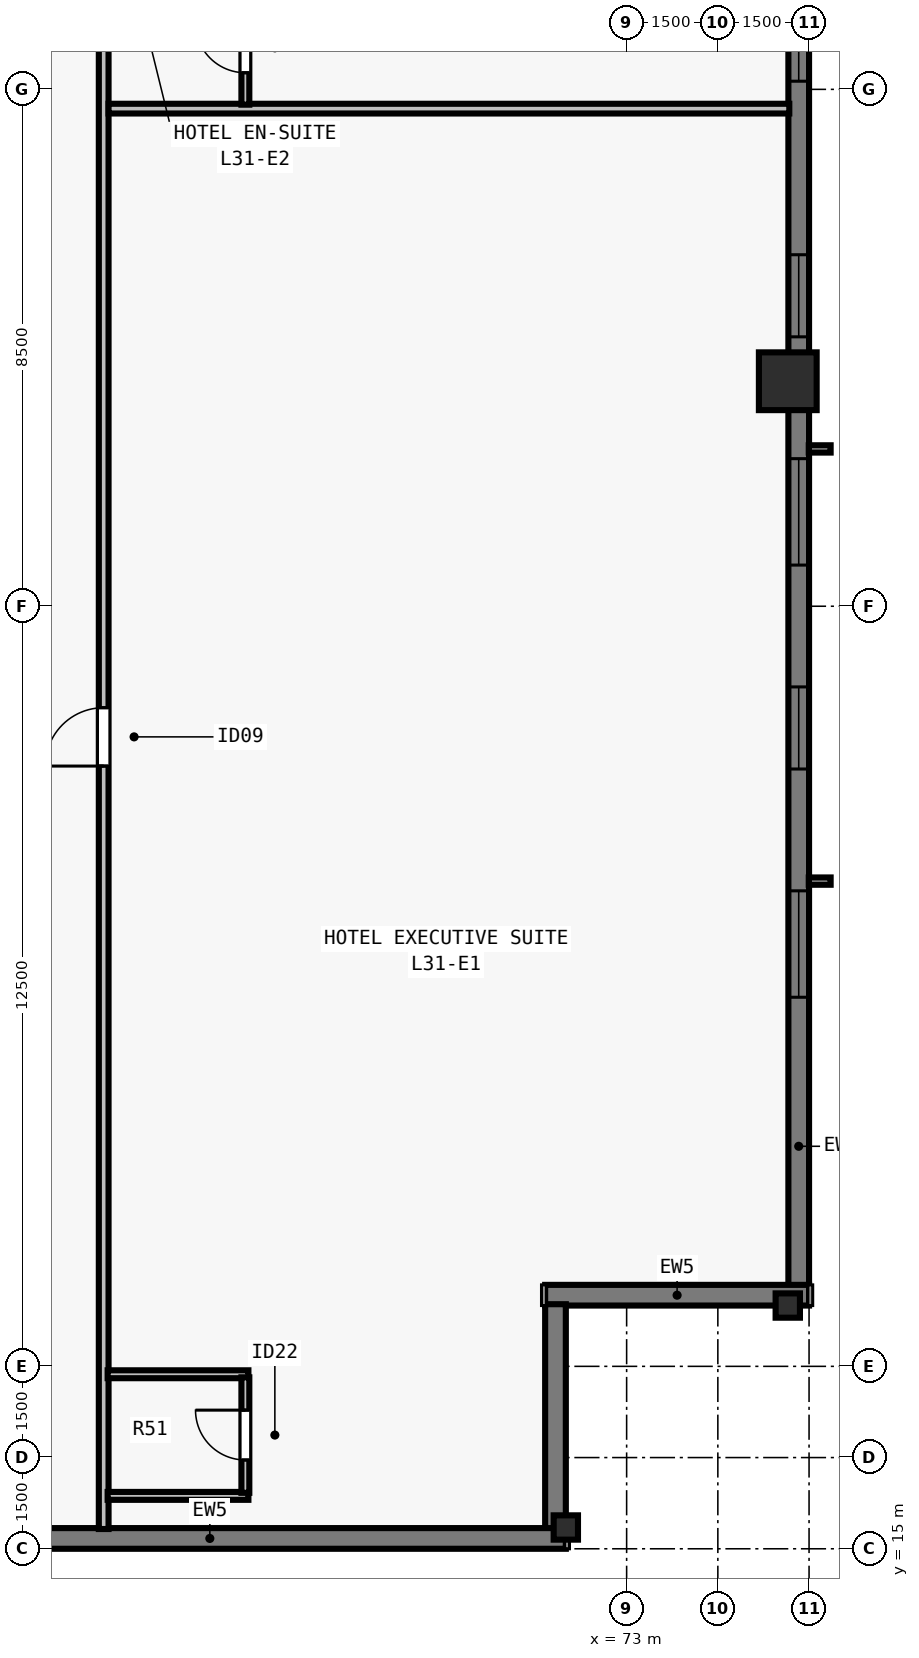
"""IFC4 building model, lengths in metres.
Left out: names, types, materials, properties, quantities, classifications, styles, units other than length and angle.
Written with IfcOpenShell. Run it as: python <this file> out.ifc"""

import sys

from ifc_helpers import new_model, si_unit, direction, frame, frame_2d, origin, origin_2d, place, context, subcontext, project, spatial, rectangle, i_section, extrude, element, fill, save


model = new_model("IFC4")
c1 = context("Model", 3, precision=1e-05, world=origin(), true_north=direction((0.0, 1.0)))
c2 = subcontext(c1, "Body", "Model", "MODEL_VIEW")
j1 = project(units=[si_unit("LENGTHUNIT", "METRE"), si_unit("PLANEANGLEUNIT", "RADIAN")], contexts=[c1])
p1 = place(None, origin())
s1 = spatial("IfcSite", under=j1, at=p1, CompositionType="ELEMENT")
p2 = place(p1, origin())
s2 = spatial("IfcBuilding", under=s1, at=p2, CompositionType="ELEMENT")
p3 = place(p2, frame((0.0, 0.0, 116.5)))
s3 = spatial("IfcBuildingStorey", under=s2, at=p3, CompositionType="ELEMENT", Elevation=116.5)
for number, where, z_axis, x_axis in (
    (1, (72.0, 15.35, 0.0), (0.0, 0.0, 1.0), (1.0, 0.0, 0.0)),
    (2, (75.65, 19.0, 0.0), (0.0, 0.0, 1.0), (0.0, 1.0, 0.0)),
):
    element("IfcColumn", number, at=place(p3, frame(where, z_axis=z_axis, x_axis=x_axis)), inside=s3, PredefinedType="COLUMN", context=c2, shape_type="SweptSolid", body=[
        extrude(i_section(OverallWidth=0.4, OverallDepth=0.4, WebThickness=0.022, FlangeThickness=0.036, at=origin_2d()), origin(), (0.0, 0.0, 1.0), 3.5),
    ])
p4 = place(p3, frame((75.65, 34.2, 0.0), z_axis=(0.0, 0.0, 1.0), x_axis=(0.0, 1.0, 0.0)))
e3 = element("IfcColumn", 3, at=p4, inside=s3, PredefinedType="COLUMN", context=c2, shape_type="SweptSolid", body=[
    extrude(rectangle(XDim=0.95, YDim=0.95, at=origin_2d()), origin(), (0.0, 0.0, 1.0), 3.5),
])
p5 = place(p3, frame((75.83, 59.0, 0.0), z_axis=(0.0, 0.0, 1.0), x_axis=(0.0, -1.0, 0.0)))
e4 = element("IfcWall", 4, at=p5, inside=s3, PredefinedType="SOLIDWALL", context=c2, shape_type="SweptSolid", body=[
    extrude(rectangle(XDim=39.682, YDim=0.34, at=frame_2d((19.841, 0.0))), origin(), (0.0, 0.0, 1.0), 3.28),
])
p6 = place(p5, frame((4.752, 0.0, 0.8)))
e5 = element("IfcOpeningElement", 5, at=p6, cuts=e4, PredefinedType="OPENING", context=c2, shape_type="SweptSolid", body=[
    extrude(rectangle(XDim=1.75, YDim=1.66, at=frame_2d((0.875, 0.83))), frame((0.0, 0.18, 0.0), z_axis=(0.0, -1.0, 0.0), x_axis=(1.0, 0.0, 0.0)), (0.0, 0.0, 1.0), 0.36),
])
p7 = place(p5, frame((8.505, 0.0, 0.8)))
e6 = element("IfcOpeningElement", 6, at=p7, cuts=e4, PredefinedType="OPENING", context=c2, shape_type="SweptSolid", body=[
    extrude(rectangle(XDim=1.35, YDim=1.66, at=frame_2d((0.675, 0.83))), frame((0.0, 0.18, 0.0), z_axis=(0.0, -1.0, 0.0), x_axis=(1.0, 0.0, 0.0)), (0.0, 0.0, 1.0), 0.36),
])
p8 = place(p5, frame((11.859, 0.0, 0.8)))
e7 = element("IfcOpeningElement", 7, at=p8, cuts=e4, PredefinedType="OPENING", context=c2, shape_type="SweptSolid", body=[
    extrude(rectangle(XDim=1.75, YDim=1.66, at=frame_2d((0.875, 0.83))), frame((0.0, 0.18, 0.0), z_axis=(0.0, -1.0, 0.0), x_axis=(1.0, 0.0, 0.0)), (0.0, 0.0, 1.0), 0.36),
])
p9 = place(p5, frame((16.062, 0.0, 0.8)))
e8 = element("IfcOpeningElement", 8, at=p9, cuts=e4, PredefinedType="OPENING", context=c2, shape_type="SweptSolid", body=[
    extrude(rectangle(XDim=1.35, YDim=1.66, at=frame_2d((0.675, 0.83))), frame((0.0, 0.18, 0.0), z_axis=(0.0, -1.0, 0.0), x_axis=(1.0, 0.0, 0.0)), (0.0, 0.0, 1.0), 0.36),
])
p10 = place(p5, frame((18.116, 0.0, 0.8)))
e9 = element("IfcOpeningElement", 9, at=p10, cuts=e4, PredefinedType="OPENING", context=c2, shape_type="SweptSolid", body=[
    extrude(rectangle(XDim=1.75, YDim=1.66, at=frame_2d((0.875, 0.83))), frame((0.0, 0.18, 0.0), z_axis=(0.0, -1.0, 0.0), x_axis=(1.0, 0.0, 0.0)), (0.0, 0.0, 1.0), 0.36),
])
p11 = place(p5, frame((22.719, 0.0, 0.8)))
e10 = element("IfcOpeningElement", 10, at=p11, cuts=e4, PredefinedType="OPENING", context=c2, shape_type="SweptSolid", body=[
    extrude(rectangle(XDim=1.35, YDim=1.66, at=frame_2d((0.675, 0.83))), frame((0.0, 0.18, 0.0), z_axis=(0.0, -1.0, 0.0), x_axis=(1.0, 0.0, 0.0)), (0.0, 0.0, 1.0), 0.36),
])
p12 = place(p5, frame((26.073, 0.0, 0.8)))
e11 = element("IfcOpeningElement", 11, at=p12, cuts=e4, PredefinedType="OPENING", context=c2, shape_type="SweptSolid", body=[
    extrude(rectangle(XDim=1.75, YDim=1.66, at=frame_2d((0.875, 0.83))), frame((0.0, 0.18, 0.0), z_axis=(0.0, -1.0, 0.0), x_axis=(1.0, 0.0, 0.0)), (0.0, 0.0, 1.0), 0.36),
])
p13 = place(p5, frame((29.827, 0.0, 0.8)))
e12 = element("IfcOpeningElement", 12, at=p13, cuts=e4, PredefinedType="OPENING", context=c2, shape_type="SweptSolid", body=[
    extrude(rectangle(XDim=1.35, YDim=1.66, at=frame_2d((0.675, 0.83))), frame((0.0, 0.18, 0.0), z_axis=(0.0, -1.0, 0.0), x_axis=(1.0, 0.0, 0.0)), (0.0, 0.0, 1.0), 0.36),
])
p14 = place(p5, frame((33.18, 0.0, 0.8)))
e13 = element("IfcOpeningElement", 13, at=p14, cuts=e4, PredefinedType="OPENING", context=c2, shape_type="SweptSolid", body=[
    extrude(rectangle(XDim=1.75, YDim=1.66, at=frame_2d((0.875, 0.83))), frame((0.0, 0.18, 0.0), z_axis=(0.0, -1.0, 0.0), x_axis=(1.0, 0.0, 0.0)), (0.0, 0.0, 1.0), 0.36),
])
p15 = place(p3, frame((76.0, 19.17, 0.0), z_axis=(0.0, 0.0, 1.0), x_axis=(-1.0, 0.0, 0.0)))
e14 = element("IfcWall", 14, at=p15, inside=s3, PredefinedType="SOLIDWALL", context=c2, shape_type="SweptSolid", body=[
    extrude(rectangle(XDim=4.34, YDim=0.34, at=frame_2d((2.17, 0.0))), origin(), (0.0, 0.0, 1.0), 3.28),
])
p16 = place(p3, frame((71.83, 19.022, 0.0), z_axis=(0.0, 0.0, 1.0), x_axis=(0.0, -1.0, 0.0)))
e15 = element("IfcWall", 15, at=p16, inside=s3, PredefinedType="SOLIDWALL", context=c2, shape_type="SweptSolid", body=[
    extrude(rectangle(XDim=3.704, YDim=0.34, at=frame_2d((1.852, 0.0))), origin(), (0.0, 0.0, 1.0), 3.28),
])
p17 = place(p3, frame((72.0, 15.17, 0.0), z_axis=(0.0, 0.0, 1.0), x_axis=(-1.0, 0.0, 0.0)))
e16 = element("IfcWall", 16, at=p17, inside=s3, PredefinedType="SOLIDWALL", context=c2, shape_type="SweptSolid", body=[
    extrude(rectangle(XDim=39.682, YDim=0.34, at=frame_2d((19.841, 0.0))), origin(), (0.0, 0.0, 1.0), 3.28),
])
p18 = place(p17, frame((11.859, 0.0, 0.8)))
e17 = element("IfcOpeningElement", 17, at=p18, cuts=e16, PredefinedType="OPENING", context=c2, shape_type="SweptSolid", body=[
    extrude(rectangle(XDim=1.75, YDim=1.66, at=frame_2d((0.875, 0.83))), frame((0.0, 0.18, 0.0), z_axis=(0.0, -1.0, 0.0), x_axis=(1.0, 0.0, 0.0)), (0.0, 0.0, 1.0), 0.36),
])
p19 = place(p17, frame((16.062, 0.0, 0.8)))
e18 = element("IfcOpeningElement", 18, at=p19, cuts=e16, PredefinedType="OPENING", context=c2, shape_type="SweptSolid", body=[
    extrude(rectangle(XDim=1.35, YDim=1.66, at=frame_2d((0.675, 0.83))), frame((0.0, 0.18, 0.0), z_axis=(0.0, -1.0, 0.0), x_axis=(1.0, 0.0, 0.0)), (0.0, 0.0, 1.0), 0.36),
])
p20 = place(p17, frame((18.966, 0.0, 0.8)))
e19 = element("IfcOpeningElement", 19, at=p20, cuts=e16, PredefinedType="OPENING", context=c2, shape_type="SweptSolid", body=[
    extrude(rectangle(XDim=1.75, YDim=1.66, at=frame_2d((0.875, 0.83))), frame((0.0, 0.18, 0.0), z_axis=(0.0, -1.0, 0.0), x_axis=(1.0, 0.0, 0.0)), (0.0, 0.0, 1.0), 0.36),
])
p21 = place(p17, frame((21.469, 0.0, 0.8)))
e20 = element("IfcOpeningElement", 20, at=p21, cuts=e16, PredefinedType="OPENING", context=c2, shape_type="SweptSolid", body=[
    extrude(rectangle(XDim=1.35, YDim=1.66, at=frame_2d((0.675, 0.83))), frame((0.0, 0.18, 0.0), z_axis=(0.0, -1.0, 0.0), x_axis=(1.0, 0.0, 0.0)), (0.0, 0.0, 1.0), 0.36),
])
p22 = place(p17, frame((27.323, 0.0, 0.8)))
e21 = element("IfcOpeningElement", 21, at=p22, cuts=e16, PredefinedType="OPENING", context=c2, shape_type="SweptSolid", body=[
    extrude(rectangle(XDim=1.75, YDim=1.66, at=frame_2d((0.875, 0.83))), frame((0.0, 0.18, 0.0), z_axis=(0.0, -1.0, 0.0), x_axis=(1.0, 0.0, 0.0)), (0.0, 0.0, 1.0), 0.36),
])
p23 = place(p17, frame((29.827, 0.0, 0.8)))
e22 = element("IfcOpeningElement", 22, at=p23, cuts=e16, PredefinedType="OPENING", context=c2, shape_type="SweptSolid", body=[
    extrude(rectangle(XDim=1.35, YDim=1.66, at=frame_2d((0.675, 0.83))), frame((0.0, 0.18, 0.0), z_axis=(0.0, -1.0, 0.0), x_axis=(1.0, 0.0, 0.0)), (0.0, 0.0, 1.0), 0.36),
])
p24 = place(p17, frame((25.43, 0.0, 0.8)))
e23 = element("IfcOpeningElement", 23, at=p24, cuts=e16, PredefinedType="OPENING", context=c2, shape_type="SweptSolid", body=[
    extrude(rectangle(XDim=0.9, YDim=1.66, at=frame_2d((0.45, 0.83))), frame((0.0, 0.18, 0.0), z_axis=(0.0, -1.0, 0.0), x_axis=(1.0, 0.0, 0.0)), (0.0, 0.0, 1.0), 0.36),
])
p25 = place(p17, frame((34.39, 0.0, 0.8)))
e24 = element("IfcOpeningElement", 24, at=p25, cuts=e16, PredefinedType="OPENING", context=c2, shape_type="SweptSolid", body=[
    extrude(rectangle(XDim=0.9, YDim=1.66, at=frame_2d((0.45, 0.83))), frame((0.0, 0.18, 0.0), z_axis=(0.0, -1.0, 0.0), x_axis=(1.0, 0.0, 0.0)), (0.0, 0.0, 1.0), 0.36),
])
p26 = place(p3, frame((64.4, 15.325, 0.0), z_axis=(0.0, 0.0, 1.0), x_axis=(0.0, 1.0, 0.0)))
e25 = element("IfcWall", 25, at=p26, inside=s3, PredefinedType="PARTITIONING", context=c2, shape_type="SweptSolid", body=[
    extrude(rectangle(XDim=47.35, YDim=0.16, at=frame_2d((23.675, 0.0))), origin(), (0.0, 0.0, 1.0), 2.555),
])
p27 = place(p26, frame((12.547, 0.0, 0.0)))
e26 = element("IfcOpeningElement", 26, at=p27, cuts=e25, PredefinedType="OPENING", context=c2, shape_type="SweptSolid", body=[
    extrude(rectangle(XDim=0.96, YDim=2.15, at=frame_2d((0.48, 1.075))), frame((0.0, 0.09, 0.0), z_axis=(0.0, -1.0, 0.0), x_axis=(1.0, 0.0, 0.0)), (0.0, 0.0, 1.0), 0.18),
])
p28 = place(p26, frame((35.902, 0.0, 0.0)))
e27 = element("IfcOpeningElement", 27, at=p28, cuts=e25, PredefinedType="OPENING", context=c2, shape_type="SweptSolid", body=[
    extrude(rectangle(XDim=0.96, YDim=2.15, at=frame_2d((0.48, 1.075))), frame((0.0, 0.09, 0.0), z_axis=(0.0, -1.0, 0.0), x_axis=(1.0, 0.0, 0.0)), (0.0, 0.0, 1.0), 0.18),
])
for number, where, z_axis, x_axis in (
    (28, (64.465, 15.87, 0.0), (0.0, 0.0, 1.0), (1.0, 0.0, 0.0)),
    (29, (64.465, 17.87, 0.0), (0.0, 0.0, 1.0), (1.0, 0.0, 0.0)),
):
    element("IfcWall", number, at=place(p3, frame(where, z_axis=z_axis, x_axis=x_axis)), inside=s3, PredefinedType="PLUMBINGWALL", context=c2, shape_type="SweptSolid", body=[
        extrude(rectangle(XDim=2.315, YDim=0.13, at=frame_2d((1.157, 0.0))), origin(), (0.0, 0.0, 1.0), 3.28),
    ])
p29 = place(p3, frame((66.73, 15.92, 0.0), z_axis=(0.0, 0.0, 1.0), x_axis=(0.0, 1.0, 0.0)))
e30 = element("IfcWall", 30, at=p29, inside=s3, PredefinedType="PLUMBINGWALL", context=c2, shape_type="SweptSolid", body=[
    extrude(rectangle(XDim=1.9, YDim=0.13, at=frame_2d((0.95, 0.0))), origin(), (0.0, 0.0, 1.0), 3.28),
])
p30 = place(p29, frame((0.54, 0.0, 0.0)))
e31 = element("IfcOpeningElement", 31, at=p30, cuts=e30, PredefinedType="OPENING", context=c2, shape_type="SweptSolid", body=[
    extrude(rectangle(XDim=0.82, YDim=2.1, at=frame_2d((0.41, 1.05))), frame((0.0, 0.075, 0.0), z_axis=(0.0, -1.0, 0.0), x_axis=(1.0, 0.0, 0.0)), (0.0, 0.0, 1.0), 0.15),
])
p31 = place(p3, frame((64.48, 38.683, 0.0), z_axis=(0.0, 0.0, 1.0), x_axis=(1.0, 0.0, 0.0)))
e32 = element("IfcWall", 32, at=p31, inside=s3, PredefinedType="PARTITIONING", context=c2, shape_type="SweptSolid", body=[
    extrude(rectangle(XDim=11.195, YDim=0.16, at=frame_2d((5.598, 0.0))), origin(), (0.0, 0.0, 1.0), 3.28),
])
p32 = place(p3, frame((66.73, 38.748, 0.0), z_axis=(0.0, 0.0, 1.0), x_axis=(0.0, 1.0, 0.0)))
e33 = element("IfcWall", 33, at=p32, inside=s3, PredefinedType="PLUMBINGWALL", context=c2, shape_type="SweptSolid", body=[
    extrude(rectangle(XDim=1.885, YDim=0.13, at=frame_2d((0.942, 0.0))), origin(), (0.0, 0.0, 1.0), 3.28),
])
p33 = place(p32, frame((0.525, 0.0, 0.0)))
e34 = element("IfcOpeningElement", 34, at=p33, cuts=e33, PredefinedType="OPENING", context=c2, shape_type="SweptSolid", body=[
    extrude(rectangle(XDim=0.82, YDim=2.1, at=frame_2d((0.41, 1.05))), frame((0.0, 0.075, 0.0), z_axis=(0.0, -1.0, 0.0), x_axis=(1.0, 0.0, 0.0)), (0.0, 0.0, 1.0), 0.15),
])
p34 = place(p10, origin())
e35 = element("IfcWindow", 35, at=p34, inside=s3, PartitioningType="SINGLE_PANEL", PredefinedType="WINDOW", context=c2, shape_type="SweptSolid", body=[
    extrude(rectangle(XDim=1.75, YDim=1.66, at=frame_2d((0.875, 0.83))), frame((0.0, -0.05, 0.0), z_axis=(0.0, -1.0, 0.0), x_axis=(1.0, 0.0, 0.0)), (0.0, 0.0, 1.0), 0.06),
])
fill(e9, e35)
p35 = place(p11, origin())
e36 = element("IfcWindow", 36, at=p35, inside=s3, PartitioningType="SINGLE_PANEL", PredefinedType="WINDOW", context=c2, shape_type="SweptSolid", body=[
    extrude(rectangle(XDim=1.35, YDim=1.66, at=frame_2d((0.675, 0.83))), frame((0.0, -0.05, 0.0), z_axis=(0.0, -1.0, 0.0), x_axis=(1.0, 0.0, 0.0)), (0.0, 0.0, 1.0), 0.06),
])
fill(e10, e36)
p36 = place(p12, origin())
e37 = element("IfcWindow", 37, at=p36, inside=s3, PartitioningType="SINGLE_PANEL", PredefinedType="WINDOW", context=c2, shape_type="SweptSolid", body=[
    extrude(rectangle(XDim=1.75, YDim=1.66, at=frame_2d((0.875, 0.83))), frame((0.0, -0.05, 0.0), z_axis=(0.0, -1.0, 0.0), x_axis=(1.0, 0.0, 0.0)), (0.0, 0.0, 1.0), 0.06),
])
fill(e11, e37)
p37 = place(p13, origin())
e38 = element("IfcWindow", 38, at=p37, inside=s3, PartitioningType="SINGLE_PANEL", PredefinedType="WINDOW", context=c2, shape_type="SweptSolid", body=[
    extrude(rectangle(XDim=1.35, YDim=1.66, at=frame_2d((0.675, 0.83))), frame((0.0, -0.05, 0.0), z_axis=(0.0, -1.0, 0.0), x_axis=(1.0, 0.0, 0.0)), (0.0, 0.0, 1.0), 0.06),
])
fill(e12, e38)
p38 = place(p14, origin())
e39 = element("IfcWindow", 39, at=p38, inside=s3, PartitioningType="SINGLE_PANEL", PredefinedType="WINDOW", context=c2, shape_type="SweptSolid", body=[
    extrude(rectangle(XDim=1.75, YDim=1.66, at=frame_2d((0.875, 0.83))), frame((0.0, -0.05, 0.0), z_axis=(0.0, -1.0, 0.0), x_axis=(1.0, 0.0, 0.0)), (0.0, 0.0, 1.0), 0.06),
])
fill(e13, e39)
p39 = place(p30, origin())
e40 = element("IfcDoor", 40, at=p39, inside=s3, OperationType="SINGLE_SWING_RIGHT", PredefinedType="DOOR", context=c2, shape_type="SweptSolid", body=[
    extrude(rectangle(XDim=0.82, YDim=2.1, at=frame_2d((0.41, 1.05))), frame((0.0, 0.025, 0.0), z_axis=(0.0, -1.0, 0.0), x_axis=(1.0, 0.0, 0.0)), (0.0, 0.0, 1.0), 0.05),
])
fill(e31, e40)
p40 = place(p27, origin())
e41 = element("IfcDoor", 41, at=p40, inside=s3, OperationType="SINGLE_SWING_LEFT", PredefinedType="DOOR", context=c2, shape_type="SweptSolid", body=[
    extrude(rectangle(XDim=0.96, YDim=2.15, at=frame_2d((0.48, 1.075))), frame((0.0, 0.025, 0.0), z_axis=(0.0, -1.0, 0.0), x_axis=(1.0, 0.0, 0.0)), (0.0, 0.0, 1.0), 0.05),
])
fill(e26, e41)
p41 = place(p33, origin())
e42 = element("IfcDoor", 42, at=p41, inside=s3, OperationType="SINGLE_SWING_RIGHT", PredefinedType="DOOR", context=c2, shape_type="SweptSolid", body=[
    extrude(rectangle(XDim=0.82, YDim=2.1, at=frame_2d((0.41, 1.05))), frame((0.0, 0.025, 0.0), z_axis=(0.0, -1.0, 0.0), x_axis=(1.0, 0.0, 0.0)), (0.0, 0.0, 1.0), 0.05),
])
fill(e34, e42)
save(model, sys.argv[1])
